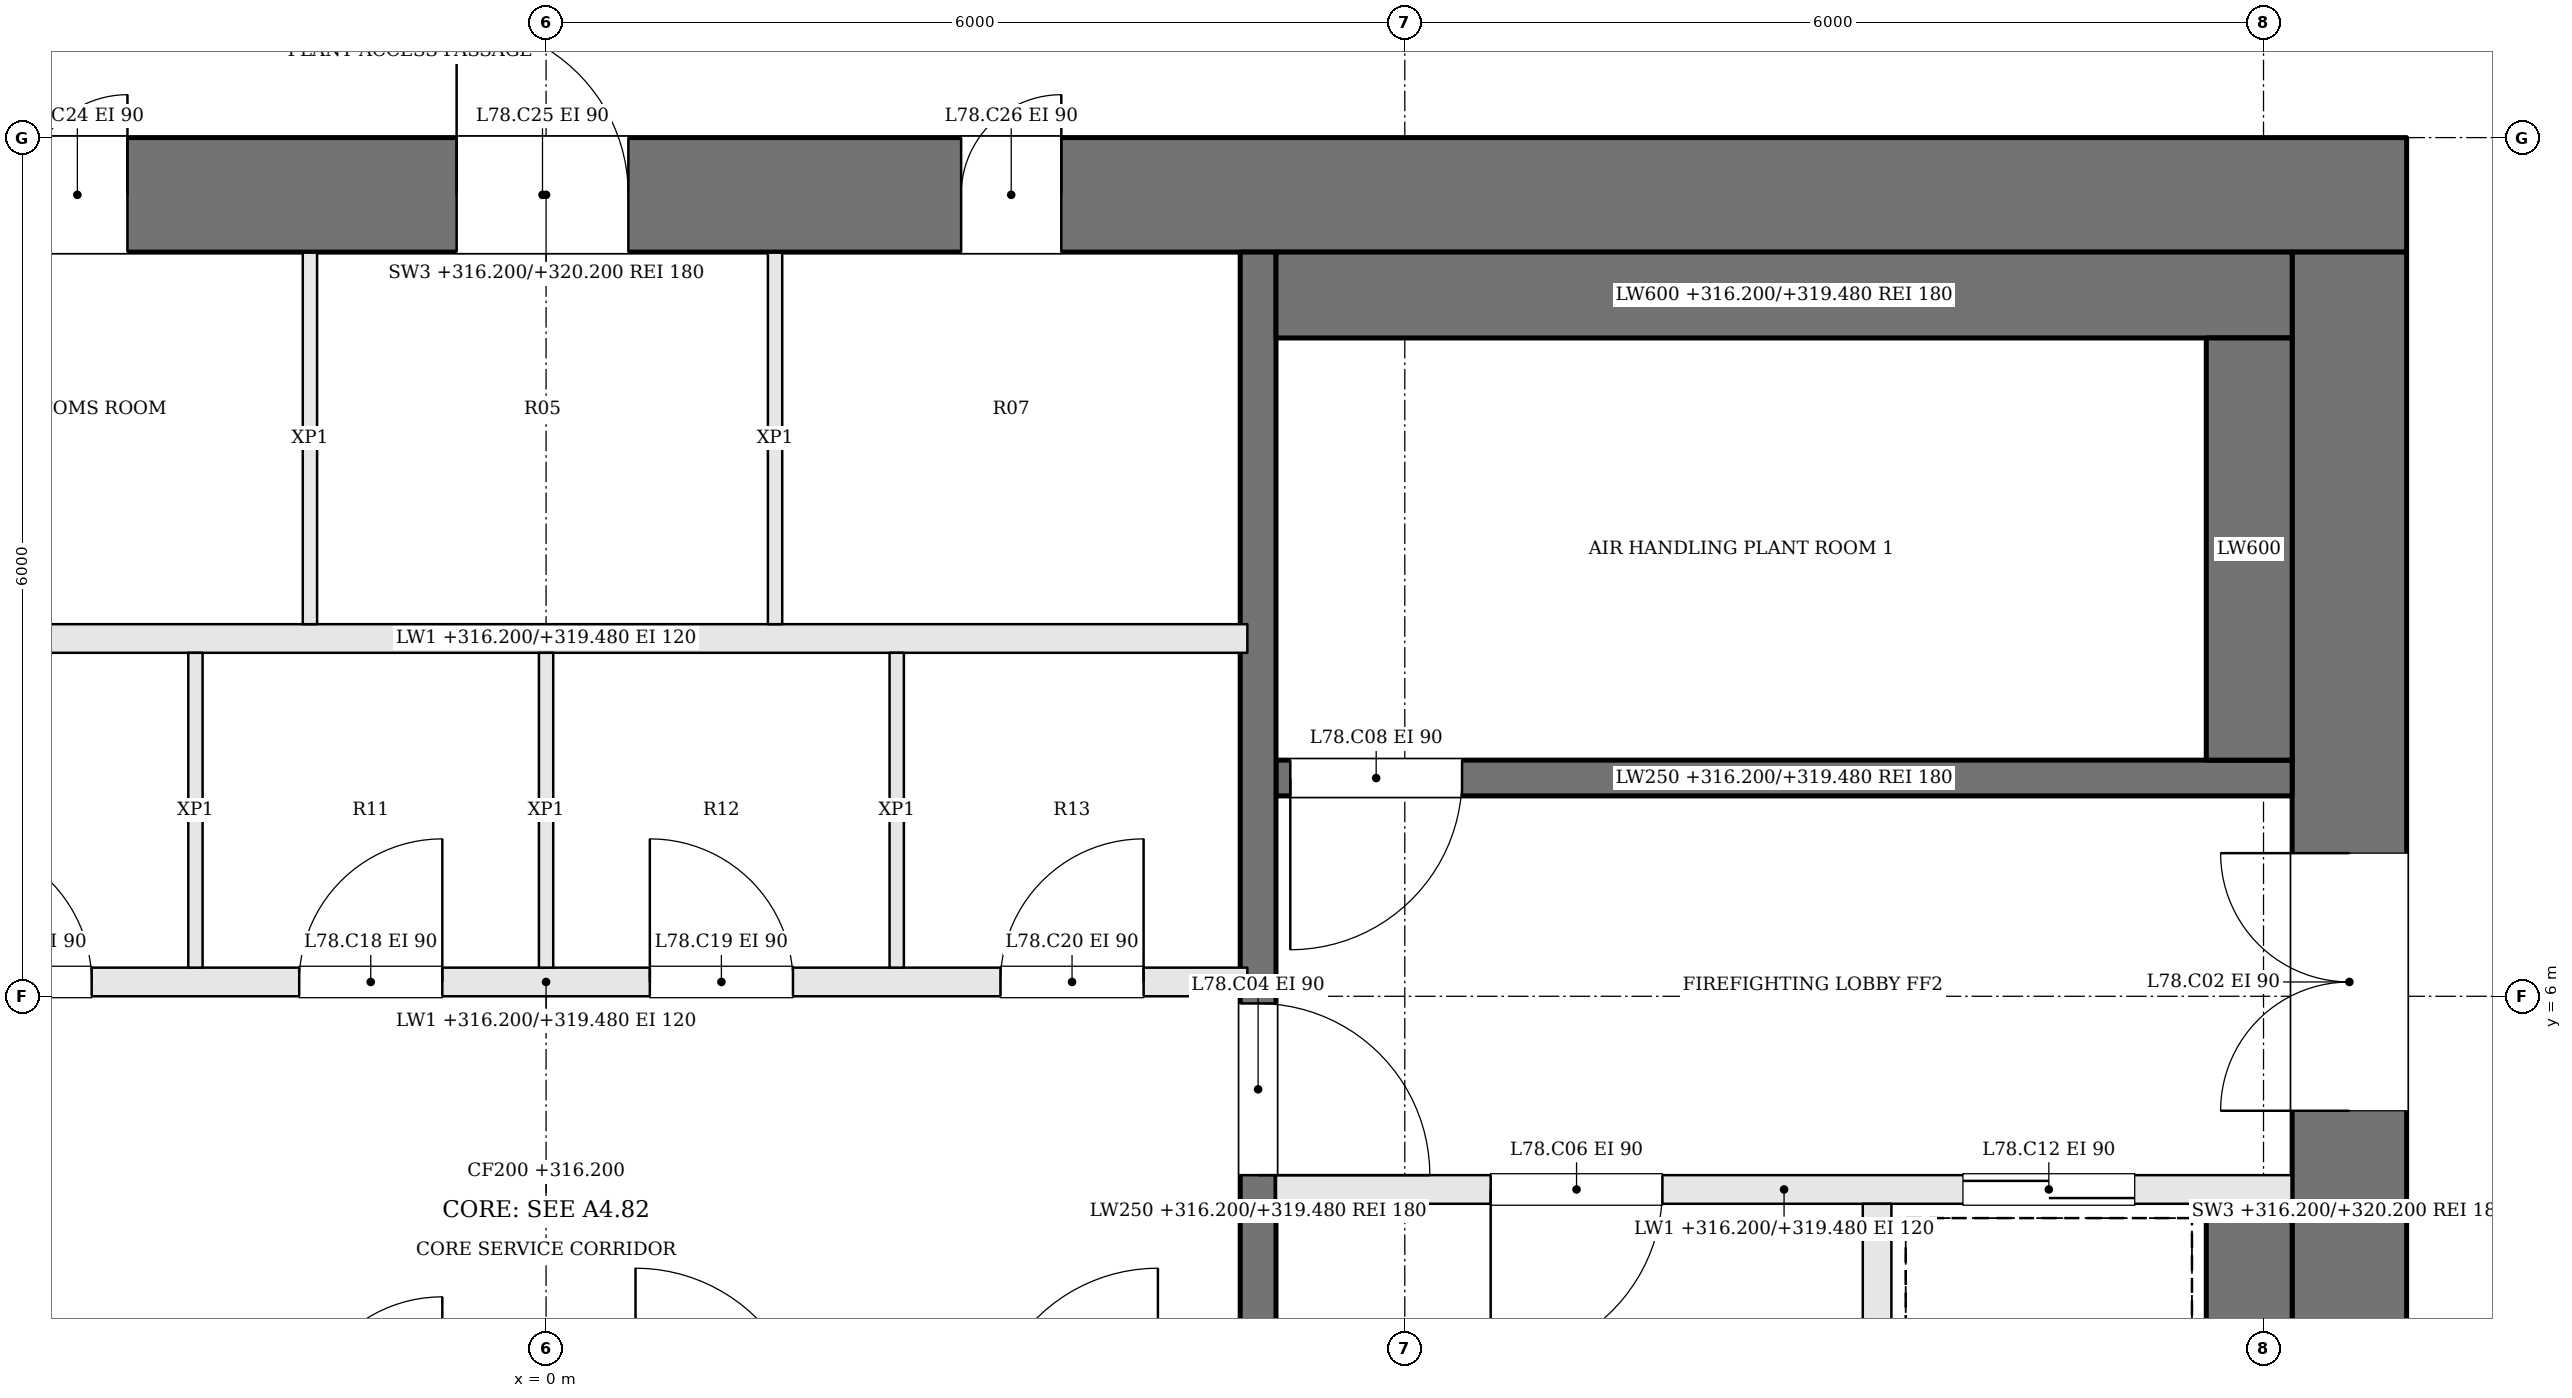
"""IFC4 building model, lengths in metres.
Left out: names, types, materials, properties, quantities, classifications, styles, units other than length and angle.
Written with IfcOpenShell. Run it as: python <this file> out.ifc"""

import sys

from ifc_helpers import new_model, si_unit, direction, frame, frame_2d, origin, place, context, subcontext, project, spatial, rectangle, extrude, element, fill, save


model = new_model("IFC4")
c1 = context("Model", 3, precision=1e-05, world=origin(), true_north=direction((0.0, 1.0)))
c2 = subcontext(c1, "Body", "Model", "MODEL_VIEW")
j1 = project(units=[si_unit("LENGTHUNIT", "METRE"), si_unit("PLANEANGLEUNIT", "RADIAN")], contexts=[c1])
p1 = place(None, origin())
s1 = spatial("IfcSite", under=j1, at=p1, CompositionType="ELEMENT")
p2 = place(p1, origin())
s2 = spatial("IfcBuilding", under=s1, at=p2, CompositionType="ELEMENT")
p3 = place(p2, frame((0.0, 0.0, 316.2)))
s3 = spatial("IfcBuildingStorey", under=s2, at=p3, CompositionType="ELEMENT", Elevation=316.2)
p4 = place(p3, frame((-13.0, 11.6, 0.0), z_axis=(0.0, 0.0, 1.0), x_axis=(1.0, 0.0, 0.0)))
e1 = element("IfcWall", 1, at=p4, inside=s3, PredefinedType="SHEAR", context=c2, shape_type="SweptSolid", body=[
    extrude(rectangle(XDim=26.0, YDim=0.8, at=frame_2d((13.0, 0.0))), origin(), (0.0, 0.0, 1.0), 4.0),
])
p5 = place(p4, frame((9.375, 0.0, 0.0)))
e2 = element("IfcOpeningElement", 2, at=p5, cuts=e1, PredefinedType="OPENING", context=c2, shape_type="SweptSolid", body=[
    extrude(rectangle(XDim=0.7, YDim=2.1, at=frame_2d((0.35, 1.05))), frame((0.0, 0.41, 0.0), z_axis=(0.0, -1.0, 0.0), x_axis=(1.0, 0.0, 0.0)), (0.0, 0.0, 1.0), 0.82),
])
p6 = place(p4, frame((12.375, 0.0, 0.0)))
e3 = element("IfcOpeningElement", 3, at=p6, cuts=e1, PredefinedType="OPENING", context=c2, shape_type="SweptSolid", body=[
    extrude(rectangle(XDim=1.2, YDim=2.1, at=frame_2d((0.6, 1.05))), frame((0.0, 0.41, 0.0), z_axis=(0.0, -1.0, 0.0), x_axis=(1.0, 0.0, 0.0)), (0.0, 0.0, 1.0), 0.82),
])
p7 = place(p4, frame((15.9, 0.0, 0.0)))
e4 = element("IfcOpeningElement", 4, at=p7, cuts=e1, PredefinedType="OPENING", context=c2, shape_type="SweptSolid", body=[
    extrude(rectangle(XDim=0.7, YDim=2.1, at=frame_2d((0.35, 1.05))), frame((0.0, 0.41, 0.0), z_axis=(0.0, -1.0, 0.0), x_axis=(1.0, 0.0, 0.0)), (0.0, 0.0, 1.0), 0.82),
])
p8 = place(p4, frame((6.7, 0.0, 0.0)))
e5 = element("IfcOpeningElement", 5, at=p8, cuts=e1, PredefinedType="OPENING", context=c2, shape_type="SweptSolid", body=[
    extrude(rectangle(XDim=0.9, YDim=2.1, at=frame_2d((0.45, 1.05))), frame((0.0, 0.41, 0.0), z_axis=(0.0, -1.0, 0.0), x_axis=(1.0, 0.0, 0.0)), (0.0, 0.0, 1.0), 0.82),
])
p9 = place(p3, frame((12.6, -2.2, 0.0), z_axis=(0.0, 0.0, 1.0), x_axis=(0.0, 1.0, 0.0)))
e6 = element("IfcWall", 6, at=p9, inside=s3, PredefinedType="SHEAR", context=c2, shape_type="SweptSolid", body=[
    extrude(rectangle(XDim=13.4, YDim=0.8, at=frame_2d((6.7, 0.0))), origin(), (0.0, 0.0, 1.0), 4.0),
])
p10 = place(p9, frame((7.4, 0.0, 0.0)))
e7 = element("IfcOpeningElement", 7, at=p10, cuts=e6, PredefinedType="OPENING", context=c2, shape_type="SweptSolid", body=[
    extrude(rectangle(XDim=1.8, YDim=2.1, at=frame_2d((0.9, 1.05))), frame((0.0, 0.41, 0.0), z_axis=(0.0, -1.0, 0.0), x_axis=(1.0, 0.0, 0.0)), (0.0, 0.0, 1.0), 0.82),
])
p11 = place(p3, frame((12.2, 7.525, 0.0), z_axis=(0.0, 0.0, 1.0), x_axis=(-1.0, 0.0, 0.0)))
e8 = element("IfcWall", 8, at=p11, inside=s3, PredefinedType="SOLIDWALL", context=c2, shape_type="SweptSolid", body=[
    extrude(rectangle(XDim=7.1, YDim=0.25, at=frame_2d((3.55, 0.0))), origin(), (0.0, 0.0, 1.0), 3.28),
])
p12 = place(p11, frame((5.8, 0.0, 0.0)))
e9 = element("IfcOpeningElement", 9, at=p12, cuts=e8, PredefinedType="OPENING", context=c2, shape_type="SweptSolid", body=[
    extrude(rectangle(XDim=1.2, YDim=2.1, at=frame_2d((0.6, 1.05))), frame((0.0, 0.135, 0.0), z_axis=(0.0, -1.0, 0.0), x_axis=(1.0, 0.0, 0.0)), (0.0, 0.0, 1.0), 0.27),
])
p13 = place(p3, frame((12.2, 4.65, 0.0), z_axis=(0.0, 0.0, 1.0), x_axis=(-1.0, 0.0, 0.0)))
e10 = element("IfcWall", 10, at=p13, inside=s3, PredefinedType="SOLIDWALL", context=c2, shape_type="SweptSolid", body=[
    extrude(rectangle(XDim=7.1, YDim=0.2, at=frame_2d((3.55, 0.0))), origin(), (0.0, 0.0, 1.0), 3.28),
])
p14 = place(p13, frame((4.4, 0.0, 0.0)))
e11 = element("IfcOpeningElement", 11, at=p14, cuts=e10, PredefinedType="OPENING", context=c2, shape_type="SweptSolid", body=[
    extrude(rectangle(XDim=1.2, YDim=2.1, at=frame_2d((0.6, 1.05))), frame((0.0, 0.11, 0.0), z_axis=(0.0, -1.0, 0.0), x_axis=(1.0, 0.0, 0.0)), (0.0, 0.0, 1.0), 0.22),
])
p15 = place(p13, frame((1.1, 0.0, 0.0)))
e12 = element("IfcOpeningElement", 12, at=p15, cuts=e10, PredefinedType="OPENING", context=c2, shape_type="SweptSolid", body=[
    extrude(rectangle(XDim=1.2, YDim=2.1, at=frame_2d((0.6, 1.05))), frame((0.0, 0.11, 0.0), z_axis=(0.0, -1.0, 0.0), x_axis=(1.0, 0.0, 0.0)), (0.0, 0.0, 1.0), 0.22),
])
p16 = place(p3, frame((9.3, 4.55, 0.0), z_axis=(0.0, 0.0, 1.0), x_axis=(0.0, -1.0, 0.0)))
e13 = element("IfcWall", 13, at=p16, inside=s3, PredefinedType="SOLIDWALL", context=c2, shape_type="SweptSolid", body=[
    extrude(rectangle(XDim=3.0, YDim=0.2, at=frame_2d((1.5, 0.0))), origin(), (0.0, 0.0, 1.0), 3.28),
])
p17 = place(p3, frame((4.975, 11.2, 0.0), z_axis=(0.0, 0.0, 1.0), x_axis=(0.0, -1.0, 0.0)))
e14 = element("IfcWall", 14, at=p17, inside=s3, PredefinedType="SOLIDWALL", context=c2, shape_type="SweptSolid", body=[
    extrude(rectangle(XDim=13.4, YDim=0.25, at=frame_2d((6.7, 0.0))), origin(), (0.0, 0.0, 1.0), 3.28),
])
p18 = place(p17, frame((5.25, 0.0, 0.0)))
e15 = element("IfcOpeningElement", 15, at=p18, cuts=e14, PredefinedType="OPENING", context=c2, shape_type="SweptSolid", body=[
    extrude(rectangle(XDim=1.2, YDim=2.1, at=frame_2d((0.6, 1.05))), frame((0.0, 0.135, 0.0), z_axis=(0.0, -1.0, 0.0), x_axis=(1.0, 0.0, 0.0)), (0.0, 0.0, 1.0), 0.27),
])
p19 = place(p3, frame((12.2, 10.9, 0.0), z_axis=(0.0, 0.0, 1.0), x_axis=(-1.0, 0.0, 0.0)))
e16 = element("IfcWall", 16, at=p19, inside=s3, PredefinedType="SOLIDWALL", context=c2, shape_type="SweptSolid", body=[
    extrude(rectangle(XDim=7.1, YDim=0.6, at=frame_2d((3.55, 0.0))), origin(), (0.0, 0.0, 1.0), 3.28),
])
p20 = place(p3, frame((11.9, 10.6, 0.0), z_axis=(0.0, 0.0, 1.0), x_axis=(0.0, -1.0, 0.0)))
e17 = element("IfcWall", 17, at=p20, inside=s3, PredefinedType="SOLIDWALL", context=c2, shape_type="SweptSolid", body=[
    extrude(rectangle(XDim=2.95, YDim=0.6, at=frame_2d((1.475, 0.0))), origin(), (0.0, 0.0, 1.0), 3.28),
])
p21 = place(p3, frame((11.9, 4.55, 0.0), z_axis=(0.0, 0.0, 1.0), x_axis=(0.0, -1.0, 0.0)))
e18 = element("IfcWall", 18, at=p21, inside=s3, PredefinedType="SOLIDWALL", context=c2, shape_type="SweptSolid", body=[
    extrude(rectangle(XDim=3.0, YDim=0.6, at=frame_2d((1.5, 0.0))), origin(), (0.0, 0.0, 1.0), 3.28),
])
p22 = place(p3, frame((-4.9, 6.1, 0.0), z_axis=(0.0, 0.0, 1.0), x_axis=(1.0, 0.0, 0.0)))
e19 = element("IfcWall", 19, at=p22, inside=s3, PredefinedType="SOLIDWALL", context=c2, shape_type="SweptSolid", body=[
    extrude(rectangle(XDim=9.8, YDim=0.2, at=frame_2d((4.9, 0.0))), origin(), (0.0, 0.0, 1.0), 3.28),
])
p23 = place(p22, frame((0.725, 0.0, 0.0)))
e20 = element("IfcOpeningElement", 20, at=p23, cuts=e19, PredefinedType="OPENING", context=c2, shape_type="SweptSolid", body=[
    extrude(rectangle(XDim=1.0, YDim=2.1, at=frame_2d((0.5, 1.05))), frame((0.0, 0.11, 0.0), z_axis=(0.0, -1.0, 0.0), x_axis=(1.0, 0.0, 0.0)), (0.0, 0.0, 1.0), 0.22),
])
p24 = place(p22, frame((3.175, 0.0, 0.0)))
e21 = element("IfcOpeningElement", 21, at=p24, cuts=e19, PredefinedType="OPENING", context=c2, shape_type="SweptSolid", body=[
    extrude(rectangle(XDim=1.0, YDim=2.1, at=frame_2d((0.5, 1.05))), frame((0.0, 0.11, 0.0), z_axis=(0.0, -1.0, 0.0), x_axis=(1.0, 0.0, 0.0)), (0.0, 0.0, 1.0), 0.22),
])
p25 = place(p22, frame((5.625, 0.0, 0.0)))
e22 = element("IfcOpeningElement", 22, at=p25, cuts=e19, PredefinedType="OPENING", context=c2, shape_type="SweptSolid", body=[
    extrude(rectangle(XDim=1.0, YDim=2.1, at=frame_2d((0.5, 1.05))), frame((0.0, 0.11, 0.0), z_axis=(0.0, -1.0, 0.0), x_axis=(1.0, 0.0, 0.0)), (0.0, 0.0, 1.0), 0.22),
])
p26 = place(p22, frame((8.075, 0.0, 0.0)))
e23 = element("IfcOpeningElement", 23, at=p26, cuts=e19, PredefinedType="OPENING", context=c2, shape_type="SweptSolid", body=[
    extrude(rectangle(XDim=1.0, YDim=2.1, at=frame_2d((0.5, 1.05))), frame((0.0, 0.11, 0.0), z_axis=(0.0, -1.0, 0.0), x_axis=(1.0, 0.0, 0.0)), (0.0, 0.0, 1.0), 0.22),
])
p27 = place(p3, frame((-4.9, 8.5, 0.0), z_axis=(0.0, 0.0, 1.0), x_axis=(1.0, 0.0, 0.0)))
e24 = element("IfcWall", 24, at=p27, inside=s3, PredefinedType="SOLIDWALL", context=c2, shape_type="SweptSolid", body=[
    extrude(rectangle(XDim=9.8, YDim=0.2, at=frame_2d((4.9, 0.0))), origin(), (0.0, 0.0, 1.0), 3.28),
])
for number, where, z_axis, x_axis in (
    (25, (-2.45, 6.2, 0.0), (0.0, 0.0, 1.0), (0.0, 1.0, 0.0)),
    (26, (0.0, 6.2, 0.0), (0.0, 0.0, 1.0), (0.0, 1.0, 0.0)),
    (27, (2.45, 6.2, 0.0), (0.0, 0.0, 1.0), (0.0, 1.0, 0.0)),
):
    element("IfcWall", number, at=place(p3, frame(where, z_axis=z_axis, x_axis=x_axis)), inside=s3, PredefinedType="PARTITIONING", context=c2, shape_type="SweptSolid", body=[
        extrude(rectangle(XDim=2.2, YDim=0.1, at=frame_2d((1.1, 0.0))), origin(), (0.0, 0.0, 1.0), 3.28),
    ])
for number, where, z_axis, x_axis in (
    (28, (-1.65, 8.6, 0.0), (0.0, 0.0, 1.0), (0.0, 1.0, 0.0)),
    (29, (1.6, 8.6, 0.0), (0.0, 0.0, 1.0), (0.0, 1.0, 0.0)),
):
    element("IfcWall", number, at=place(p3, frame(where, z_axis=z_axis, x_axis=x_axis)), inside=s3, PredefinedType="PARTITIONING", context=c2, shape_type="SweptSolid", body=[
        extrude(rectangle(XDim=2.6, YDim=0.1, at=frame_2d((1.3, 0.0))), origin(), (0.0, 0.0, 1.0), 3.28),
    ])
p28 = place(p10, origin())
e30 = element("IfcDoor", 30, at=p28, inside=s3, OperationType="DOUBLE_DOOR_SINGLE_SWING", PredefinedType="DOOR", context=c2, shape_type="SweptSolid", body=[
    extrude(rectangle(XDim=1.8, YDim=2.1, at=frame_2d((0.9, 1.05))), frame((0.0, 0.025, 0.0), z_axis=(0.0, -1.0, 0.0), x_axis=(1.0, 0.0, 0.0)), (0.0, 0.0, 1.0), 0.05),
])
fill(e7, e30)
p29 = place(p18, origin())
e31 = element("IfcDoor", 31, at=p29, inside=s3, OperationType="SINGLE_SWING_RIGHT", PredefinedType="DOOR", context=c2, shape_type="SweptSolid", body=[
    extrude(rectangle(XDim=1.2, YDim=2.1, at=frame_2d((0.6, 1.05))), frame((0.0, 0.025, 0.0), z_axis=(0.0, -1.0, 0.0), x_axis=(1.0, 0.0, 0.0)), (0.0, 0.0, 1.0), 0.05),
])
fill(e15, e31)
p30 = place(p14, origin())
e32 = element("IfcDoor", 32, at=p30, inside=s3, OperationType="SINGLE_SWING_RIGHT", PredefinedType="DOOR", context=c2, shape_type="SweptSolid", body=[
    extrude(rectangle(XDim=1.2, YDim=2.1, at=frame_2d((0.6, 1.05))), frame((0.0, 0.025, 0.0), z_axis=(0.0, -1.0, 0.0), x_axis=(1.0, 0.0, 0.0)), (0.0, 0.0, 1.0), 0.05),
])
fill(e11, e32)
p31 = place(p12, origin())
e33 = element("IfcDoor", 33, at=p31, inside=s3, OperationType="SINGLE_SWING_RIGHT", PredefinedType="DOOR", context=c2, shape_type="SweptSolid", body=[
    extrude(rectangle(XDim=1.2, YDim=2.1, at=frame_2d((0.6, 1.05))), frame((0.0, 0.025, 0.0), z_axis=(0.0, -1.0, 0.0), x_axis=(1.0, 0.0, 0.0)), (0.0, 0.0, 1.0), 0.05),
])
fill(e9, e33)
p32 = place(p15, origin())
e34 = element("IfcDoor", 34, at=p32, inside=s3, OperationType="SLIDING_TO_RIGHT", PredefinedType="DOOR", context=c2, shape_type="SweptSolid", body=[
    extrude(rectangle(XDim=1.2, YDim=2.1, at=frame_2d((0.6, 1.05))), frame((0.0, 0.025, 0.0), z_axis=(0.0, -1.0, 0.0), x_axis=(1.0, 0.0, 0.0)), (0.0, 0.0, 1.0), 0.05),
])
fill(e12, e34)
p33 = place(p23, origin())
e35 = element("IfcDoor", 35, at=p33, inside=s3, OperationType="SINGLE_SWING_LEFT", PredefinedType="DOOR", context=c2, shape_type="SweptSolid", body=[
    extrude(rectangle(XDim=1.0, YDim=2.1, at=frame_2d((0.5, 1.05))), frame((0.0, 0.025, 0.0), z_axis=(0.0, -1.0, 0.0), x_axis=(1.0, 0.0, 0.0)), (0.0, 0.0, 1.0), 0.05),
])
fill(e20, e35)
p34 = place(p24, origin())
e36 = element("IfcDoor", 36, at=p34, inside=s3, OperationType="SINGLE_SWING_RIGHT", PredefinedType="DOOR", context=c2, shape_type="SweptSolid", body=[
    extrude(rectangle(XDim=1.0, YDim=2.1, at=frame_2d((0.5, 1.05))), frame((0.0, 0.025, 0.0), z_axis=(0.0, -1.0, 0.0), x_axis=(1.0, 0.0, 0.0)), (0.0, 0.0, 1.0), 0.05),
])
fill(e21, e36)
p35 = place(p25, origin())
e37 = element("IfcDoor", 37, at=p35, inside=s3, OperationType="SINGLE_SWING_LEFT", PredefinedType="DOOR", context=c2, shape_type="SweptSolid", body=[
    extrude(rectangle(XDim=1.0, YDim=2.1, at=frame_2d((0.5, 1.05))), frame((0.0, 0.025, 0.0), z_axis=(0.0, -1.0, 0.0), x_axis=(1.0, 0.0, 0.0)), (0.0, 0.0, 1.0), 0.05),
])
fill(e22, e37)
p36 = place(p26, origin())
e38 = element("IfcDoor", 38, at=p36, inside=s3, OperationType="SINGLE_SWING_RIGHT", PredefinedType="DOOR", context=c2, shape_type="SweptSolid", body=[
    extrude(rectangle(XDim=1.0, YDim=2.1, at=frame_2d((0.5, 1.05))), frame((0.0, 0.025, 0.0), z_axis=(0.0, -1.0, 0.0), x_axis=(1.0, 0.0, 0.0)), (0.0, 0.0, 1.0), 0.05),
])
fill(e23, e38)
p37 = place(p5, origin())
e39 = element("IfcDoor", 39, at=p37, inside=s3, OperationType="SINGLE_SWING_RIGHT", PredefinedType="DOOR", context=c2, shape_type="SweptSolid", body=[
    extrude(rectangle(XDim=0.7, YDim=2.1, at=frame_2d((0.35, 1.05))), frame((0.0, 0.025, 0.0), z_axis=(0.0, -1.0, 0.0), x_axis=(1.0, 0.0, 0.0)), (0.0, 0.0, 1.0), 0.05),
])
fill(e2, e39)
p38 = place(p6, origin())
e40 = element("IfcDoor", 40, at=p38, inside=s3, OperationType="SINGLE_SWING_LEFT", PredefinedType="DOOR", context=c2, shape_type="SweptSolid", body=[
    extrude(rectangle(XDim=1.2, YDim=2.1, at=frame_2d((0.6, 1.05))), frame((0.0, 0.025, 0.0), z_axis=(0.0, -1.0, 0.0), x_axis=(1.0, 0.0, 0.0)), (0.0, 0.0, 1.0), 0.05),
])
fill(e3, e40)
p39 = place(p7, origin())
e41 = element("IfcDoor", 41, at=p39, inside=s3, OperationType="SINGLE_SWING_RIGHT", PredefinedType="DOOR", context=c2, shape_type="SweptSolid", body=[
    extrude(rectangle(XDim=0.7, YDim=2.1, at=frame_2d((0.35, 1.05))), frame((0.0, 0.025, 0.0), z_axis=(0.0, -1.0, 0.0), x_axis=(1.0, 0.0, 0.0)), (0.0, 0.0, 1.0), 0.05),
])
fill(e4, e41)
save(model, sys.argv[1])
